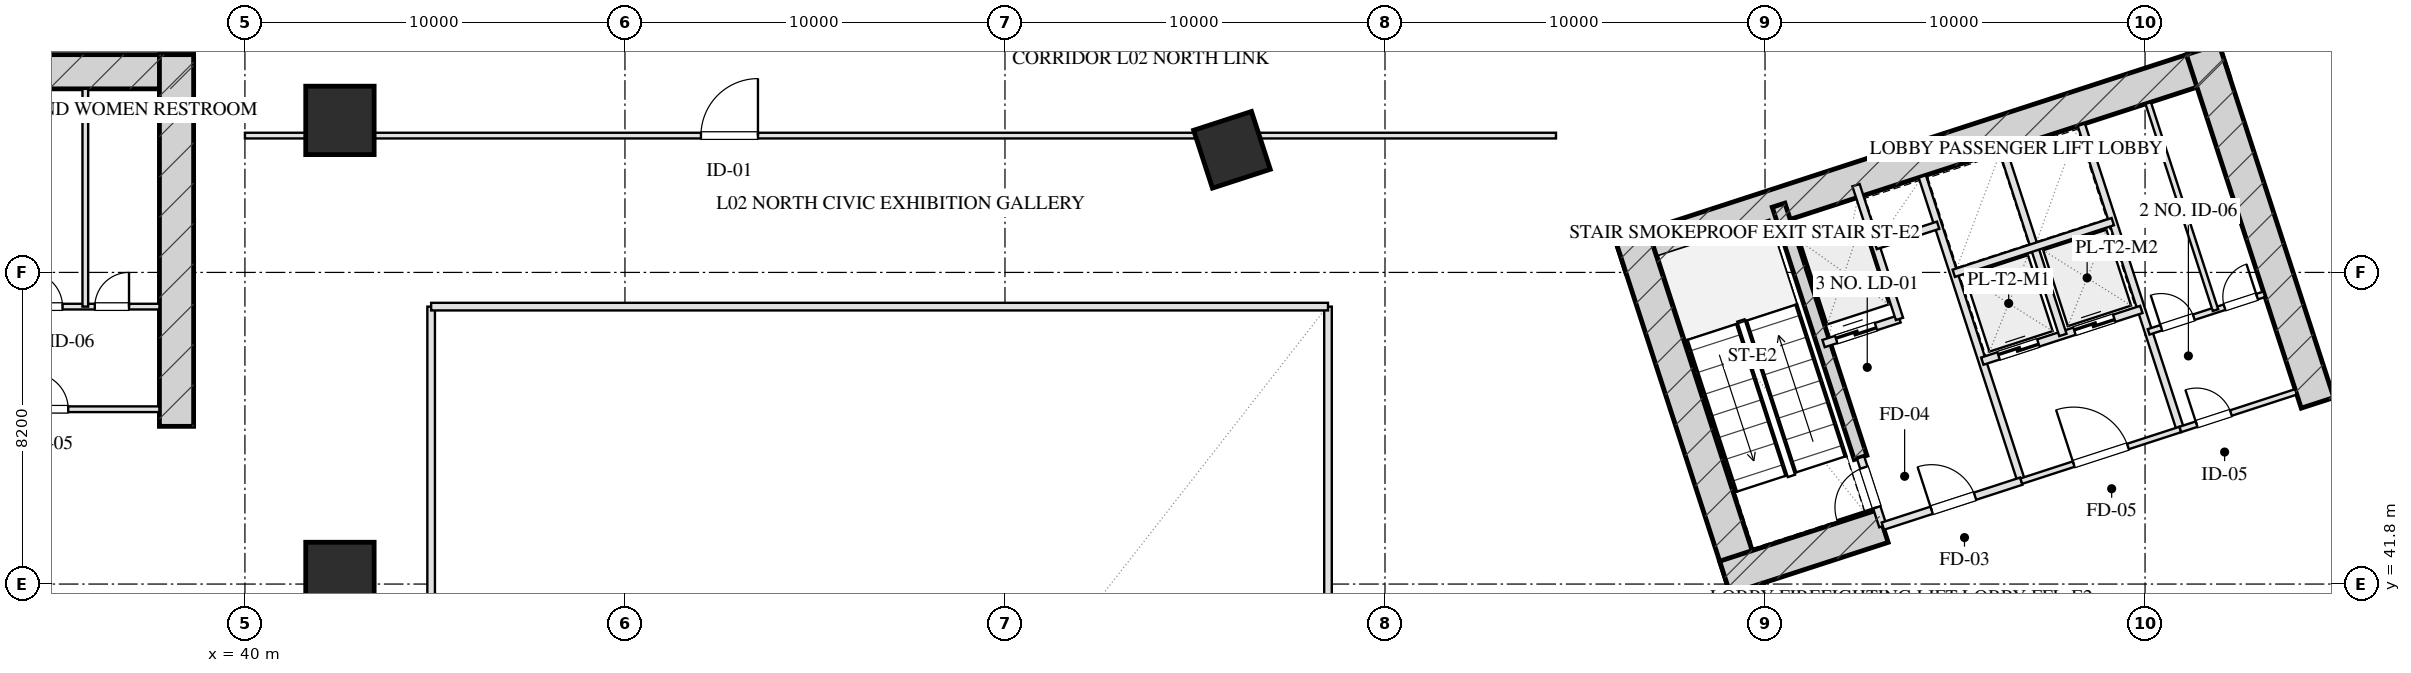
"""IFC4 building model, lengths in metres.
Left out: names, types, materials, properties, quantities, classifications, styles, units other than length and angle.
Written with IfcOpenShell. Run it as: python <this file> out.ifc"""

import sys

from ifc_helpers import new_model, si_unit, direction, frame, frame_2d, origin, origin_2d, place, context, subcontext, project, spatial, rectangle, hollow_rectangle, extrude, element, fill, save


model = new_model("IFC4")
c1 = context("Model", 3, precision=1e-05, world=origin(), true_north=direction((0.0, 1.0)))
c2 = subcontext(c1, "Body", "Model", "MODEL_VIEW")
j1 = project(units=[si_unit("LENGTHUNIT", "METRE"), si_unit("PLANEANGLEUNIT", "RADIAN")], contexts=[c1])
p1 = place(None, origin())
s1 = spatial("IfcSite", under=j1, at=p1, CompositionType="ELEMENT")
p2 = place(p1, origin())
s2 = spatial("IfcBuilding", under=s1, at=p2, CompositionType="ELEMENT")
p3 = place(p2, frame((0.0, 0.0, 11.5)))
s3 = spatial("IfcBuildingStorey", under=s2, at=p3, CompositionType="ELEMENT", Elevation=11.5)
p4 = place(p3, frame((21.35, 55.28, 0.0), z_axis=(0.0, 0.0, 1.0), x_axis=(1.0, 0.0, 0.0)))
e1 = element("IfcWall", 1, at=p4, inside=s3, PredefinedType="SHEAR", context=c2, shape_type="SweptSolid", body=[
    extrude(rectangle(XDim=17.3, YDim=0.9, at=frame_2d((8.65, 0.0))), origin(), (0.0, 0.0, 1.0), 5.0),
])
p5 = place(p3, frame((38.2, 45.95, 0.0), z_axis=(0.0, 0.0, 1.0), x_axis=(0.0, 1.0, 0.0)))
e2 = element("IfcWall", 2, at=p5, inside=s3, PredefinedType="SHEAR", context=c2, shape_type="SweptSolid", body=[
    extrude(rectangle(XDim=9.78, YDim=0.9, at=frame_2d((4.89, 0.0))), origin(), (0.0, 0.0, 1.0), 5.0),
])
p6 = place(p3, frame((76.201, 50.419, 0.0), z_axis=(0.0, 0.0, 1.0), x_axis=(0.951056412142, 0.309017314926, 0.0)))
e3 = element("IfcWall", 3, at=p6, inside=s3, PredefinedType="SHEAR", context=c2, shape_type="SweptSolid", body=[
    extrude(rectangle(XDim=16.7, YDim=0.9, at=frame_2d((8.35, 0.0))), origin(), (0.0, 0.0, 1.0), 5.0),
])
for number, where, z_axis, x_axis in (
    (4, (79.512, 41.685, 0.0), (0.0, 0.0, 1.0), (-0.309, 0.951, 0.0)),
    (5, (94.539, 46.568, 0.0), (0.0, 0.0, 1.0), (-0.309, 0.951, 0.0)),
):
    element("IfcWall", number, at=place(p3, frame(where, z_axis=z_axis, x_axis=x_axis)), inside=s3, PredefinedType="SHEAR", context=c2, shape_type="SweptSolid", body=[
        extrude(rectangle(XDim=9.78, YDim=0.9, at=frame_2d((4.89, 0.0))), origin(), (0.0, 0.0, 1.0), 5.0),
    ])
p7 = place(p3, frame((82.514, 45.131, 0.0), z_axis=(0.0, 0.0, 1.0), x_axis=(-0.308988790936, 0.951065679686, 0.0)))
e6 = element("IfcWall", 6, at=p7, inside=s3, PredefinedType="SHEAR", context=c2, shape_type="SweptSolid", body=[
    extrude(rectangle(XDim=6.98, YDim=0.35, at=frame_2d((3.49, 0.0))), origin(), (0.0, 0.0, 1.0), 5.0),
])
p8 = place(p3, frame((78.945, 41.974, 0.0), z_axis=(0.0, 0.0, 1.0), x_axis=(0.951058289404, 0.309011537255, 0.0)))
e7 = element("IfcWall", 7, at=p8, inside=s3, PredefinedType="SHEAR", context=c2, shape_type="SweptSolid", body=[
    extrude(rectangle(XDim=4.37, YDim=0.9, at=frame_2d((2.185, 0.0))), origin(), (0.0, 0.0, 1.0), 5.0),
])
for number, where, z_axis, x_axis in (
    (8, (42.5, 42.0, 0.0), (0.0, 0.0, 1.0), (1.0, 0.0, 0.0)),
    (9, (42.5, 54.0, 0.0), (0.0, 0.0, 1.0), (1.0, 0.0, 0.0)),
):
    element("IfcColumn", number, at=place(p3, frame(where, z_axis=z_axis, x_axis=x_axis)), inside=s3, PredefinedType="COLUMN", context=c2, shape_type="SweptSolid", body=[
        extrude(hollow_rectangle(XDim=1.8, YDim=1.8, WallThickness=0.06, at=origin_2d()), origin(), (0.0, 0.0, 1.0), 5.001),
    ])
p9 = place(p3, frame((65.973, 53.226, 0.0), z_axis=(0.0, 0.0, 1.0), x_axis=(0.951056516295, 0.309016994375, 0.0)))
e10 = element("IfcColumn", 10, at=p9, inside=s3, PredefinedType="COLUMN", context=c2, shape_type="SweptSolid", body=[
    extrude(hollow_rectangle(XDim=1.6, YDim=1.6, WallThickness=0.055, at=origin_2d()), origin(), (0.0, 0.0, 1.0), 5.001),
])
p10 = place(p3, frame((33.95, 46.4, 0.0), z_axis=(0.0, 0.0, 1.0), x_axis=(1.0, 0.0, 0.0)))
e11 = element("IfcWall", 11, at=p10, inside=s3, PredefinedType="PARTITIONING", context=c2, shape_type="SweptSolid", body=[
    extrude(rectangle(XDim=3.8, YDim=0.15, at=frame_2d((1.9, 0.0))), origin(), (0.0, 0.0, 1.0), 4.685),
])
p11 = place(p10, frame((0.45, 0.0, 0.0)))
e12 = element("IfcOpeningElement", 12, at=p11, cuts=e11, PredefinedType="OPENING", context=c2, shape_type="SweptSolid", body=[
    extrude(rectangle(XDim=0.95, YDim=2.05, at=frame_2d((0.475, 1.025))), frame((0.0, 0.085, 0.0), z_axis=(0.0, -1.0, 0.0), x_axis=(1.0, 0.0, 0.0)), (0.0, 0.0, 1.0), 0.17),
])
p12 = place(p3, frame((33.95, 49.1, 0.0), z_axis=(0.0, 0.0, 1.0), x_axis=(1.0, 0.0, 0.0)))
e13 = element("IfcWall", 13, at=p12, inside=s3, PredefinedType="PARTITIONING", context=c2, shape_type="SweptSolid", body=[
    extrude(rectangle(XDim=3.8, YDim=0.15, at=frame_2d((1.9, 0.0))), origin(), (0.0, 0.0, 1.0), 4.685),
])
p13 = place(p12, frame((0.35, 0.0, 0.0)))
e14 = element("IfcOpeningElement", 14, at=p13, cuts=e13, PredefinedType="OPENING", context=c2, shape_type="SweptSolid", body=[
    extrude(rectangle(XDim=0.9, YDim=2.05, at=frame_2d((0.45, 1.025))), frame((0.0, 0.085, 0.0), z_axis=(0.0, -1.0, 0.0), x_axis=(1.0, 0.0, 0.0)), (0.0, 0.0, 1.0), 0.17),
])
p14 = place(p12, frame((2.1, 0.0, 0.0)))
e15 = element("IfcOpeningElement", 15, at=p14, cuts=e13, PredefinedType="OPENING", context=c2, shape_type="SweptSolid", body=[
    extrude(rectangle(XDim=0.9, YDim=2.05, at=frame_2d((0.45, 1.025))), frame((0.0, 0.085, 0.0), z_axis=(0.0, -1.0, 0.0), x_axis=(1.0, 0.0, 0.0)), (0.0, 0.0, 1.0), 0.17),
])
p15 = place(p3, frame((35.8, 49.1, 0.0), z_axis=(0.0, 0.0, 1.0), x_axis=(0.0, 1.0, 0.0)))
e16 = element("IfcWall", 16, at=p15, inside=s3, PredefinedType="PARTITIONING", context=c2, shape_type="SweptSolid", body=[
    extrude(rectangle(XDim=5.73, YDim=0.15, at=frame_2d((2.865, 0.0))), origin(), (0.0, 0.0, 1.0), 4.685),
])
p16 = place(p3, frame((83.101, 43.324, 0.0), z_axis=(0.0, 0.0, 1.0), x_axis=(-0.309048298632, 0.951046344356, 0.0)))
e17 = element("IfcWall", 17, at=p16, inside=s3, PredefinedType="PARTITIONING", context=c2, shape_type="SweptSolid", body=[
    extrude(rectangle(XDim=1.9, YDim=0.2, at=frame_2d((0.95, 0.0))), origin(), (0.0, 0.0, 1.0), 4.685),
])
p17 = place(p16, frame((0.52, 0.0, 0.0)))
e18 = element("IfcOpeningElement", 18, at=p17, cuts=e17, PredefinedType="OPENING", context=c2, shape_type="SweptSolid", body=[
    extrude(rectangle(XDim=1.1, YDim=2.05, at=frame_2d((0.55, 1.025))), frame((0.0, 0.11, 0.0), z_axis=(0.0, -1.0, 0.0), x_axis=(1.0, 0.0, 0.0)), (0.0, 0.0, 1.0), 0.22),
])
p18 = place(p3, frame((86.743, 44.508, 0.0), z_axis=(0.0, 0.0, 1.0), x_axis=(-0.309016001439, 0.951056838919, 0.0)))
e19 = element("IfcWall", 19, at=p18, inside=s3, PredefinedType="PARTITIONING", context=c2, shape_type="SweptSolid", body=[
    extrude(rectangle(XDim=8.43, YDim=0.2, at=frame_2d((4.215, 0.0))), origin(), (0.0, 0.0, 1.0), 4.685),
])
p19 = place(p3, frame((83.101, 43.324, 0.0), z_axis=(0.0, 0.0, 1.0), x_axis=(0.951052804469, 0.309028417967, 0.0)))
e20 = element("IfcWall", 20, at=p19, inside=s3, PredefinedType="PARTITIONING", context=c2, shape_type="SweptSolid", body=[
    extrude(rectangle(XDim=3.83, YDim=0.2, at=frame_2d((1.915, 0.0))), origin(), (0.0, 0.0, 1.0), 4.685),
])
p20 = place(p19, frame((1.35, 0.0, 0.0)))
e21 = element("IfcOpeningElement", 21, at=p20, cuts=e20, PredefinedType="OPENING", context=c2, shape_type="SweptSolid", body=[
    extrude(rectangle(XDim=1.2, YDim=2.05, at=frame_2d((0.6, 1.025))), frame((0.0, 0.11, 0.0), z_axis=(0.0, -1.0, 0.0), x_axis=(1.0, 0.0, 0.0)), (0.0, 0.0, 1.0), 0.22),
])
p21 = place(p3, frame((81.54, 48.127, 0.0), z_axis=(0.0, 0.0, 1.0), x_axis=(0.951062257173, 0.308999325213, 0.0)))
e22 = element("IfcWall", 22, at=p21, inside=s3, PredefinedType="PARTITIONING", context=c2, shape_type="SweptSolid", body=[
    extrude(rectangle(XDim=2.1, YDim=0.2, at=frame_2d((1.05, 0.0))), origin(), (0.0, 0.0, 1.0), 4.685),
])
p22 = place(p21, frame((0.35, 0.0, 0.0)))
e23 = element("IfcOpeningElement", 23, at=p22, cuts=e22, PredefinedType="OPENING", context=c2, shape_type="SweptSolid", body=[
    extrude(rectangle(XDim=1.1, YDim=2.05, at=frame_2d((0.55, 1.025))), frame((0.0, 0.11, 0.0), z_axis=(0.0, -1.0, 0.0), x_axis=(1.0, 0.0, 0.0)), (0.0, 0.0, 1.0), 0.22),
])
p23 = place(p3, frame((83.538, 48.776, 0.0), z_axis=(0.0, 0.0, 1.0), x_axis=(-0.3089935693, 0.951064127245, 0.0)))
e24 = element("IfcWall", 24, at=p23, inside=s3, PredefinedType="PARTITIONING", context=c2, shape_type="SweptSolid", body=[
    extrude(rectangle(XDim=3.7, YDim=0.2, at=frame_2d((1.85, 0.0))), origin(), (0.0, 0.0, 1.0), 4.685),
])
p24 = place(p3, frame((82.91, 50.707, 0.0), z_axis=(0.0, 0.0, 1.0), x_axis=(0.951041328149, 0.309063734775, 0.0)))
e25 = element("IfcWall", 25, at=p24, inside=s3, PredefinedType="PARTITIONING", context=c2, shape_type="SweptSolid", body=[
    extrude(rectangle(XDim=1.73, YDim=0.2, at=frame_2d((0.865, 0.0))), origin(), (0.0, 0.0, 1.0), 4.685),
])
p25 = place(p3, frame((90.928, 45.868, 0.0), z_axis=(0.0, 0.0, 1.0), x_axis=(-0.309042196757, 0.951048327176, 0.0)))
e26 = element("IfcWall", 26, at=p25, inside=s3, PredefinedType="PARTITIONING", context=c2, shape_type="SweptSolid", body=[
    extrude(rectangle(XDim=8.43, YDim=0.2, at=frame_2d((4.215, 0.0))), origin(), (0.0, 0.0, 1.0), 4.685),
])
p26 = place(p3, frame((86.743, 44.508, 0.0), z_axis=(0.0, 0.0, 1.0), x_axis=(0.951063829732, 0.308994485023, 0.0)))
e27 = element("IfcWall", 27, at=p26, inside=s3, PredefinedType="PARTITIONING", context=c2, shape_type="SweptSolid", body=[
    extrude(rectangle(XDim=4.4, YDim=0.15, at=frame_2d((2.2, 0.0))), origin(), (0.0, 0.0, 1.0), 4.685),
])
p27 = place(p26, frame((1.45, 0.0, 0.0)))
e28 = element("IfcOpeningElement", 28, at=p27, cuts=e27, PredefinedType="OPENING", context=c2, shape_type="SweptSolid", body=[
    extrude(rectangle(XDim=1.5, YDim=2.05, at=frame_2d((0.75, 1.025))), frame((0.0, 0.085, 0.0), z_axis=(0.0, -1.0, 0.0), x_axis=(1.0, 0.0, 0.0)), (0.0, 0.0, 1.0), 0.17),
])
p28 = place(p3, frame((85.718, 47.666, 0.0), z_axis=(0.0, 0.0, 1.0), x_axis=(0.951058531764, 0.30901079133, 0.0)))
e29 = element("IfcWall", 29, at=p28, inside=s3, PredefinedType="PARTITIONING", context=c2, shape_type="SweptSolid", body=[
    extrude(rectangle(XDim=4.4, YDim=0.2, at=frame_2d((2.2, 0.0))), origin(), (0.0, 0.0, 1.0), 4.685),
])
p29 = place(p28, frame((0.45, 0.0, 0.0)))
e30 = element("IfcOpeningElement", 30, at=p29, cuts=e29, PredefinedType="OPENING", context=c2, shape_type="SweptSolid", body=[
    extrude(rectangle(XDim=1.1, YDim=2.05, at=frame_2d((0.55, 1.025))), frame((0.0, 0.11, 0.0), z_axis=(0.0, -1.0, 0.0), x_axis=(1.0, 0.0, 0.0)), (0.0, 0.0, 1.0), 0.22),
])
p30 = place(p28, frame((2.55, 0.0, 0.0)))
e31 = element("IfcOpeningElement", 31, at=p30, cuts=e29, PredefinedType="OPENING", context=c2, shape_type="SweptSolid", body=[
    extrude(rectangle(XDim=1.1, YDim=2.05, at=frame_2d((0.55, 1.025))), frame((0.0, 0.11, 0.0), z_axis=(0.0, -1.0, 0.0), x_axis=(1.0, 0.0, 0.0)), (0.0, 0.0, 1.0), 0.22),
])
p31 = place(p3, frame((87.838, 48.354, 0.0), z_axis=(0.0, 0.0, 1.0), x_axis=(-0.3090093719, 0.951058992953, 0.0)))
e32 = element("IfcWall", 32, at=p31, inside=s3, PredefinedType="PARTITIONING", context=c2, shape_type="SweptSolid", body=[
    extrude(rectangle(XDim=5.11, YDim=0.2, at=frame_2d((2.555, 0.0))), origin(), (0.0, 0.0, 1.0), 4.685),
])
p32 = place(p3, frame((84.967, 49.977, 0.0), z_axis=(0.0, 0.0, 1.0), x_axis=(0.951063829732, 0.308994485023, 0.0)))
e33 = element("IfcWall", 33, at=p32, inside=s3, PredefinedType="PARTITIONING", context=c2, shape_type="SweptSolid", body=[
    extrude(rectangle(XDim=4.4, YDim=0.2, at=frame_2d((2.2, 0.0))), origin(), (0.0, 0.0, 1.0), 4.685),
])
p33 = place(p3, frame((90.928, 45.868, 0.0), z_axis=(0.0, 0.0, 1.0), x_axis=(0.951059297078, 0.309008435874, 0.0)))
e34 = element("IfcWall", 34, at=p33, inside=s3, PredefinedType="PARTITIONING", context=c2, shape_type="SweptSolid", body=[
    extrude(rectangle(XDim=3.2, YDim=0.15, at=frame_2d((1.6, 0.0))), origin(), (0.0, 0.0, 1.0), 4.685),
])
p34 = place(p33, frame((0.45, 0.0, 0.0)))
e35 = element("IfcOpeningElement", 35, at=p34, cuts=e34, PredefinedType="OPENING", context=c2, shape_type="SweptSolid", body=[
    extrude(rectangle(XDim=0.95, YDim=2.05, at=frame_2d((0.475, 1.025))), frame((0.0, 0.085, 0.0), z_axis=(0.0, -1.0, 0.0), x_axis=(1.0, 0.0, 0.0)), (0.0, 0.0, 1.0), 0.17),
])
p35 = place(p3, frame((90.094, 48.436, 0.0), z_axis=(0.0, 0.0, 1.0), x_axis=(0.951066581729, 0.308986014439, 0.0)))
e36 = element("IfcWall", 36, at=p35, inside=s3, PredefinedType="PARTITIONING", context=c2, shape_type="SweptSolid", body=[
    extrude(rectangle(XDim=3.2, YDim=0.15, at=frame_2d((1.6, 0.0))), origin(), (0.0, 0.0, 1.0), 4.685),
])
p36 = place(p35, frame((0.35, 0.0, 0.0)))
e37 = element("IfcOpeningElement", 37, at=p36, cuts=e36, PredefinedType="OPENING", context=c2, shape_type="SweptSolid", body=[
    extrude(rectangle(XDim=0.9, YDim=2.05, at=frame_2d((0.45, 1.025))), frame((0.0, 0.085, 0.0), z_axis=(0.0, -1.0, 0.0), x_axis=(1.0, 0.0, 0.0)), (0.0, 0.0, 1.0), 0.17),
])
p37 = place(p35, frame((2.1, 0.0, 0.0)))
e38 = element("IfcOpeningElement", 38, at=p37, cuts=e36, PredefinedType="OPENING", context=c2, shape_type="SweptSolid", body=[
    extrude(rectangle(XDim=0.9, YDim=2.05, at=frame_2d((0.45, 1.025))), frame((0.0, 0.085, 0.0), z_axis=(0.0, -1.0, 0.0), x_axis=(1.0, 0.0, 0.0)), (0.0, 0.0, 1.0), 0.17),
])
p38 = place(p3, frame((91.853, 49.007, 0.0), z_axis=(0.0, 0.0, 1.0), x_axis=(-0.309022487551, 0.951054731437, 0.0)))
e39 = element("IfcWall", 39, at=p38, inside=s3, PredefinedType="PARTITIONING", context=c2, shape_type="SweptSolid", body=[
    extrude(rectangle(XDim=5.73, YDim=0.15, at=frame_2d((2.865, 0.0))), origin(), (0.0, 0.0, 1.0), 4.685),
])
for number, where, z_axis, x_axis in (
    (40, (44.9, 18.9, 0.0), (0.0, 0.0, 1.0), (0.0, 1.0, 0.0)),
    (41, (68.5, 18.9, 0.0), (0.0, 0.0, 1.0), (0.0, 1.0, 0.0)),
):
    element("IfcWall", number, at=place(p3, frame(where, z_axis=z_axis, x_axis=x_axis)), inside=s3, PredefinedType="PARTITIONING", context=c2, shape_type="SweptSolid", body=[
        extrude(rectangle(XDim=30.2, YDim=0.2, at=frame_2d((15.1, 0.0))), origin(), (0.0, 0.0, 1.0), 4.685),
    ])
p39 = place(p3, frame((44.9, 49.1, 0.0), z_axis=(0.0, 0.0, 1.0), x_axis=(1.0, 0.0, 0.0)))
e42 = element("IfcWall", 42, at=p39, inside=s3, PredefinedType="PARTITIONING", context=c2, shape_type="SweptSolid", body=[
    extrude(rectangle(XDim=23.6, YDim=0.2, at=frame_2d((11.8, 0.0))), origin(), (0.0, 0.0, 1.0), 4.685),
])
p40 = place(p3, frame((40.0, 53.6, 0.0), z_axis=(0.0, 0.0, 1.0), x_axis=(1.0, 0.0, 0.0)))
e43 = element("IfcWall", 43, at=p40, inside=s3, PredefinedType="PARTITIONING", context=c2, shape_type="SweptSolid", body=[
    extrude(rectangle(XDim=34.5, YDim=0.15, at=frame_2d((17.25, 0.0))), origin(), (0.0, 0.0, 1.0), 4.685),
])
p41 = place(p40, frame((12.0, 0.0, 0.0)))
e44 = element("IfcOpeningElement", 44, at=p41, cuts=e43, PredefinedType="OPENING", context=c2, shape_type="SweptSolid", body=[
    extrude(rectangle(XDim=1.5, YDim=2.05, at=frame_2d((0.75, 1.025))), frame((0.0, 0.085, 0.0), z_axis=(0.0, -1.0, 0.0), x_axis=(1.0, 0.0, 0.0)), (0.0, 0.0, 1.0), 0.17),
])
p42 = place(p11, origin())
e45 = element("IfcDoor", 45, at=p42, inside=s3, OperationType="SINGLE_SWING_LEFT", PredefinedType="DOOR", context=c2, shape_type="SweptSolid", body=[
    extrude(rectangle(XDim=0.95, YDim=2.05, at=frame_2d((0.475, 1.025))), frame((0.0, 0.025, 0.0), z_axis=(0.0, -1.0, 0.0), x_axis=(1.0, 0.0, 0.0)), (0.0, 0.0, 1.0), 0.05),
])
fill(e12, e45)
p43 = place(p13, origin())
e46 = element("IfcDoor", 46, at=p43, inside=s3, OperationType="SINGLE_SWING_LEFT", PredefinedType="DOOR", context=c2, shape_type="SweptSolid", body=[
    extrude(rectangle(XDim=0.9, YDim=2.05, at=frame_2d((0.45, 1.025))), frame((0.0, 0.025, 0.0), z_axis=(0.0, -1.0, 0.0), x_axis=(1.0, 0.0, 0.0)), (0.0, 0.0, 1.0), 0.05),
])
fill(e14, e46)
p44 = place(p14, origin())
e47 = element("IfcDoor", 47, at=p44, inside=s3, OperationType="SINGLE_SWING_RIGHT", PredefinedType="DOOR", context=c2, shape_type="SweptSolid", body=[
    extrude(rectangle(XDim=0.9, YDim=2.05, at=frame_2d((0.45, 1.025))), frame((0.0, 0.025, 0.0), z_axis=(0.0, -1.0, 0.0), x_axis=(1.0, 0.0, 0.0)), (0.0, 0.0, 1.0), 0.05),
])
fill(e15, e47)
p45 = place(p17, origin())
e48 = element("IfcDoor", 48, at=p45, inside=s3, OperationType="SINGLE_SWING_LEFT", PredefinedType="DOOR", context=c2, shape_type="SweptSolid", body=[
    extrude(rectangle(XDim=1.1, YDim=2.05, at=frame_2d((0.55, 1.025))), frame((0.0, 0.025, 0.0), z_axis=(0.0, -1.0, 0.0), x_axis=(1.0, 0.0, 0.0)), (0.0, 0.0, 1.0), 0.05),
])
fill(e18, e48)
p46 = place(p20, origin())
e49 = element("IfcDoor", 49, at=p46, inside=s3, OperationType="SINGLE_SWING_LEFT", PredefinedType="DOOR", context=c2, shape_type="SweptSolid", body=[
    extrude(rectangle(XDim=1.2, YDim=2.05, at=frame_2d((0.6, 1.025))), frame((0.0, 0.025, 0.0), z_axis=(0.0, -1.0, 0.0), x_axis=(1.0, 0.0, 0.0)), (0.0, 0.0, 1.0), 0.05),
])
fill(e21, e49)
p47 = place(p22, origin())
e50 = element("IfcDoor", 50, at=p47, inside=s3, OperationType="DOUBLE_DOOR_SLIDING", PredefinedType="DOOR", context=c2, shape_type="SweptSolid", body=[
    extrude(rectangle(XDim=1.1, YDim=2.05, at=frame_2d((0.55, 1.025))), frame((0.0, 0.025, 0.0), z_axis=(0.0, -1.0, 0.0), x_axis=(1.0, 0.0, 0.0)), (0.0, 0.0, 1.0), 0.05),
])
fill(e23, e50)
p48 = place(p27, origin())
e51 = element("IfcDoor", 51, at=p48, inside=s3, OperationType="SINGLE_SWING_LEFT", PredefinedType="DOOR", context=c2, shape_type="SweptSolid", body=[
    extrude(rectangle(XDim=1.5, YDim=2.05, at=frame_2d((0.75, 1.025))), frame((0.0, 0.025, 0.0), z_axis=(0.0, -1.0, 0.0), x_axis=(1.0, 0.0, 0.0)), (0.0, 0.0, 1.0), 0.05),
])
fill(e28, e51)
p49 = place(p29, origin())
e52 = element("IfcDoor", 52, at=p49, inside=s3, OperationType="DOUBLE_DOOR_SLIDING", PredefinedType="DOOR", context=c2, shape_type="SweptSolid", body=[
    extrude(rectangle(XDim=1.1, YDim=2.05, at=frame_2d((0.55, 1.025))), frame((0.0, 0.025, 0.0), z_axis=(0.0, -1.0, 0.0), x_axis=(1.0, 0.0, 0.0)), (0.0, 0.0, 1.0), 0.05),
])
fill(e30, e52)
p50 = place(p30, origin())
e53 = element("IfcDoor", 53, at=p50, inside=s3, OperationType="DOUBLE_DOOR_SLIDING", PredefinedType="DOOR", context=c2, shape_type="SweptSolid", body=[
    extrude(rectangle(XDim=1.1, YDim=2.05, at=frame_2d((0.55, 1.025))), frame((0.0, 0.025, 0.0), z_axis=(0.0, -1.0, 0.0), x_axis=(1.0, 0.0, 0.0)), (0.0, 0.0, 1.0), 0.05),
])
fill(e31, e53)
p51 = place(p34, origin())
e54 = element("IfcDoor", 54, at=p51, inside=s3, OperationType="SINGLE_SWING_LEFT", PredefinedType="DOOR", context=c2, shape_type="SweptSolid", body=[
    extrude(rectangle(XDim=0.95, YDim=2.05, at=frame_2d((0.475, 1.025))), frame((0.0, 0.025, 0.0), z_axis=(0.0, -1.0, 0.0), x_axis=(1.0, 0.0, 0.0)), (0.0, 0.0, 1.0), 0.05),
])
fill(e35, e54)
p52 = place(p36, origin())
e55 = element("IfcDoor", 55, at=p52, inside=s3, OperationType="SINGLE_SWING_LEFT", PredefinedType="DOOR", context=c2, shape_type="SweptSolid", body=[
    extrude(rectangle(XDim=0.9, YDim=2.05, at=frame_2d((0.45, 1.025))), frame((0.0, 0.025, 0.0), z_axis=(0.0, -1.0, 0.0), x_axis=(1.0, 0.0, 0.0)), (0.0, 0.0, 1.0), 0.05),
])
fill(e37, e55)
p53 = place(p37, origin())
e56 = element("IfcDoor", 56, at=p53, inside=s3, OperationType="SINGLE_SWING_RIGHT", PredefinedType="DOOR", context=c2, shape_type="SweptSolid", body=[
    extrude(rectangle(XDim=0.9, YDim=2.05, at=frame_2d((0.45, 1.025))), frame((0.0, 0.025, 0.0), z_axis=(0.0, -1.0, 0.0), x_axis=(1.0, 0.0, 0.0)), (0.0, 0.0, 1.0), 0.05),
])
fill(e38, e56)
p54 = place(p41, origin())
e57 = element("IfcDoor", 57, at=p54, inside=s3, OperationType="SINGLE_SWING_RIGHT", PredefinedType="DOOR", context=c2, shape_type="SweptSolid", body=[
    extrude(rectangle(XDim=1.5, YDim=2.05, at=frame_2d((0.75, 1.025))), frame((0.0, 0.025, 0.0), z_axis=(0.0, -1.0, 0.0), x_axis=(1.0, 0.0, 0.0)), (0.0, 0.0, 1.0), 0.05),
])
fill(e44, e57)
save(model, sys.argv[1])
